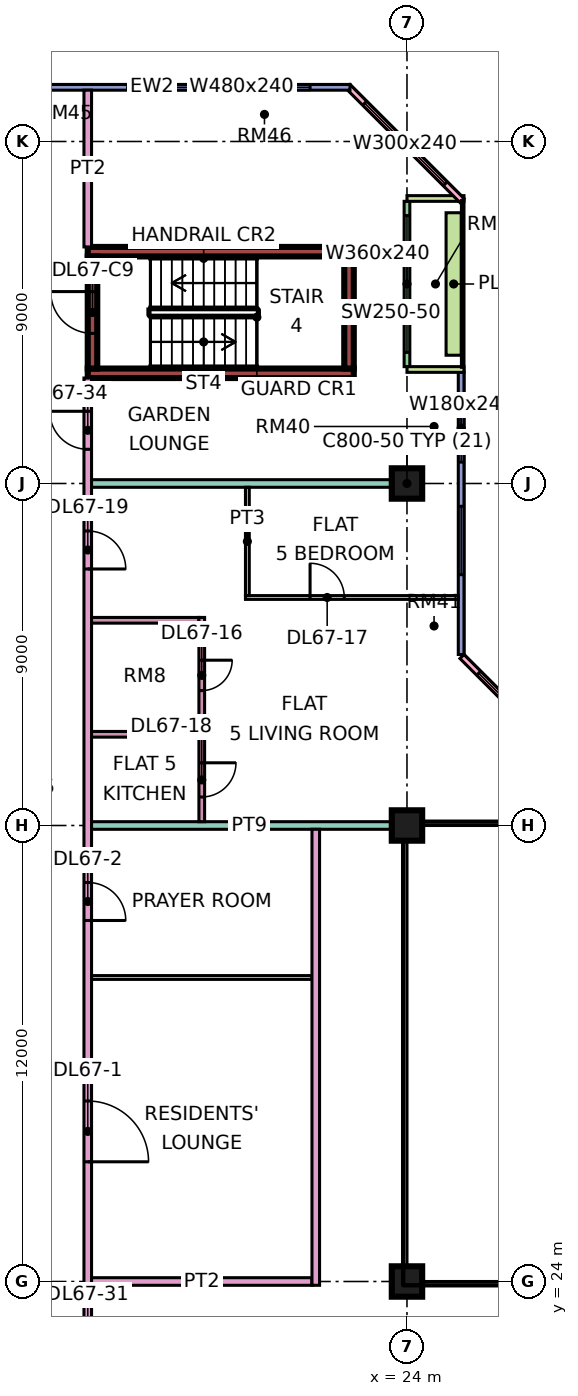
"""IFC4 building model, lengths in metres.
Left out: names, types, materials, properties, quantities, classifications, styles, units other than length and angle.
Written with IfcOpenShell. Run it as: python <this file> out.ifc"""

import sys

from ifc_helpers import new_model, si_unit, direction, frame, frame_2d, origin, origin_2d, place, context, subcontext, project, spatial, rectangle, extrude, element, fill, save


model = new_model("IFC4")
c1 = context("Model", 3, precision=1e-05, world=origin(), true_north=direction((0.0, 1.0)))
c2 = subcontext(c1, "Body", "Model", "MODEL_VIEW")
j1 = project(units=[si_unit("LENGTHUNIT", "METRE"), si_unit("PLANEANGLEUNIT", "RADIAN")], contexts=[c1])
p1 = place(None, origin())
s1 = spatial("IfcSite", under=j1, at=p1, CompositionType="ELEMENT")
p2 = place(p1, origin())
s2 = spatial("IfcBuilding", under=s1, at=p2, CompositionType="ELEMENT")
p3 = place(p2, frame((0.0, 0.0, 288.4)))
s3 = spatial("IfcBuildingStorey", under=s2, at=p3, CompositionType="ELEMENT", Elevation=288.4)
for number, where, z_axis, x_axis in (
    (1, (24.0, 24.0, 0.0), (0.0, 0.0, 1.0), (1.0, 0.0, 0.0)),
    (2, (24.0, 36.0, 0.0), (0.0, 0.0, 1.0), (1.0, 0.0, 0.0)),
    (3, (24.0, 45.0, 0.0), (0.0, 0.0, 1.0), (1.0, 0.0, 0.0)),
):
    element("IfcColumn", number, at=place(p3, frame(where, z_axis=z_axis, x_axis=x_axis)), inside=s3, PredefinedType="COLUMN", context=c2, shape_type="SweptSolid", body=[
        extrude(rectangle(XDim=0.8, YDim=0.8, at=origin_2d()), origin(), (0.0, 0.0, 1.0), 3.75),
    ])
for number, where, z_axis, x_axis in (
    (4, (15.6, 47.9, 0.0), (0.0, 0.0, 1.0), (1.0, 0.0, 0.0)),
    (5, (15.6, 51.1, 0.0), (0.0, 0.0, 1.0), (1.0, 0.0, 0.0)),
):
    element("IfcWall", number, at=place(p3, frame(where, z_axis=z_axis, x_axis=x_axis)), inside=s3, PredefinedType="SHEAR", context=c2, shape_type="SweptSolid", body=[
        extrude(rectangle(XDim=7.0, YDim=0.25, at=frame_2d((3.5, 0.0))), origin(), (0.0, 0.0, 1.0), 3.75),
    ])
p4 = place(p3, frame((15.725, 48.025, 0.0), z_axis=(0.0, 0.0, 1.0), x_axis=(0.0, 1.0, 0.0)))
e6 = element("IfcWall", 6, at=p4, inside=s3, PredefinedType="SHEAR", context=c2, shape_type="SweptSolid", body=[
    extrude(rectangle(XDim=2.95, YDim=0.25, at=frame_2d((1.475, 0.0))), origin(), (0.0, 0.0, 1.0), 3.75),
])
p5 = place(p4, frame((0.925, 0.0, 0.0)))
e7 = element("IfcOpeningElement", 7, at=p5, cuts=e6, PredefinedType="OPENING", context=c2, shape_type="SweptSolid", body=[
    extrude(rectangle(XDim=1.1, YDim=2.2, at=frame_2d((0.55, 1.1))), frame((0.0, 0.135, 0.0), z_axis=(0.0, -1.0, 0.0), x_axis=(1.0, 0.0, 0.0)), (0.0, 0.0, 1.0), 0.27),
])
p6 = place(p3, frame((22.475, 48.025, 0.0), z_axis=(0.0, 0.0, 1.0), x_axis=(0.0, 1.0, 0.0)))
e8 = element("IfcWall", 8, at=p6, inside=s3, PredefinedType="SHEAR", context=c2, shape_type="SweptSolid", body=[
    extrude(rectangle(XDim=2.95, YDim=0.25, at=frame_2d((1.475, 0.0))), origin(), (0.0, 0.0, 1.0), 3.75),
])
p7 = place(p3, frame((28.447, 37.447, 0.0), z_axis=(0.0, 0.0, 1.0), x_axis=(-0.707106781187, 0.707106781187, 0.0)))
e9 = element("IfcWall", 9, at=p7, inside=s3, PredefinedType="SOLIDWALL", context=c2, shape_type="SweptSolid", body=[
    extrude(rectangle(XDim=4.243, YDim=0.15, at=frame_2d((2.121, 0.0))), origin(), (0.0, 0.0, 1.0), 3.35),
])
p8 = place(p7, frame((0.621, 0.0, 0.45)))
e10 = element("IfcOpeningElement", 10, at=p8, cuts=e9, PredefinedType="OPENING", context=c2, shape_type="SweptSolid", body=[
    extrude(rectangle(XDim=3.0, YDim=2.4, at=frame_2d((1.5, 1.2))), frame((0.0, 0.085, 0.0), z_axis=(0.0, -1.0, 0.0), x_axis=(1.0, 0.0, 0.0)), (0.0, 0.0, 1.0), 0.17),
])
p9 = place(p3, frame((25.425, 40.5, 0.0), z_axis=(0.0, 0.0, 1.0), x_axis=(0.0, 1.0, 0.0)))
e11 = element("IfcWall", 11, at=p9, inside=s3, PredefinedType="SOLIDWALL", context=c2, shape_type="SweptSolid", body=[
    extrude(rectangle(XDim=7.425, YDim=0.15, at=frame_2d((3.712, 0.0))), origin(), (0.0, 0.0, 1.0), 3.35),
])
p10 = place(p9, frame((2.1, 0.0, 0.45)))
e12 = element("IfcOpeningElement", 12, at=p10, cuts=e11, PredefinedType="OPENING", context=c2, shape_type="SweptSolid", body=[
    extrude(rectangle(XDim=1.8, YDim=2.4, at=frame_2d((0.9, 1.2))), frame((0.0, 0.085, 0.0), z_axis=(0.0, -1.0, 0.0), x_axis=(1.0, 0.0, 0.0)), (0.0, 0.0, 1.0), 0.17),
])
p11 = place(p9, frame((5.062, 0.0, 0.45)))
e13 = element("IfcOpeningElement", 13, at=p11, cuts=e11, PredefinedType="OPENING", context=c2, shape_type="SweptSolid", body=[
    extrude(rectangle(XDim=1.8, YDim=2.4, at=frame_2d((0.9, 1.2))), frame((0.0, 0.085, 0.0), z_axis=(0.0, -1.0, 0.0), x_axis=(1.0, 0.0, 0.0)), (0.0, 0.0, 1.0), 0.17),
])
p12 = place(p3, frame((24.0, 48.075, 0.0), z_axis=(0.0, 0.0, 1.0), x_axis=(0.0, 1.0, 0.0)))
e14 = element("IfcWall", 14, at=p12, inside=s3, PredefinedType="SOLIDWALL", context=c2, shape_type="SweptSolid", body=[
    extrude(rectangle(XDim=4.35, YDim=0.15, at=frame_2d((2.175, 0.0))), origin(), (0.0, 0.0, 1.0), 3.35),
])
p13 = place(p12, frame((0.375, 0.0, 0.45)))
e15 = element("IfcOpeningElement", 15, at=p13, cuts=e14, PredefinedType="OPENING", context=c2, shape_type="SweptSolid", body=[
    extrude(rectangle(XDim=3.6, YDim=2.4, at=frame_2d((1.8, 1.2))), frame((0.0, 0.085, 0.0), z_axis=(0.0, -1.0, 0.0), x_axis=(1.0, 0.0, 0.0)), (0.0, 0.0, 1.0), 0.17),
])
for number, where, z_axis, x_axis in (
    (16, (25.5, 48.0, 0.0), (0.0, 0.0, 1.0), (-1.0, 0.0, 0.0)),
    (17, (25.5, 52.5, 0.0), (0.0, 0.0, 1.0), (-1.0, 0.0, 0.0)),
):
    element("IfcWall", number, at=place(p3, frame(where, z_axis=z_axis, x_axis=x_axis)), inside=s3, PredefinedType="SOLIDWALL", context=c2, shape_type="SweptSolid", body=[
        extrude(rectangle(XDim=1.5, YDim=0.15, at=frame_2d((0.75, 0.0))), origin(), (0.0, 0.0, 1.0), 3.35),
    ])
p14 = place(p3, frame((25.447, 52.447, 0.0), z_axis=(0.0, 0.0, 1.0), x_axis=(-0.707106781187, 0.707106781187, 0.0)))
e18 = element("IfcWall", 18, at=p14, inside=s3, PredefinedType="SOLIDWALL", context=c2, shape_type="SweptSolid", body=[
    extrude(rectangle(XDim=4.243, YDim=0.15, at=frame_2d((2.121, 0.0))), origin(), (0.0, 0.0, 1.0), 3.35),
])
p15 = place(p14, frame((0.621, 0.0, 0.45)))
e19 = element("IfcOpeningElement", 19, at=p15, cuts=e18, PredefinedType="OPENING", context=c2, shape_type="SweptSolid", body=[
    extrude(rectangle(XDim=3.0, YDim=2.4, at=frame_2d((1.5, 1.2))), frame((0.0, 0.085, 0.0), z_axis=(0.0, -1.0, 0.0), x_axis=(1.0, 0.0, 0.0)), (0.0, 0.0, 1.0), 0.17),
])
p16 = place(p3, frame((22.5, 55.425, 0.0), z_axis=(0.0, 0.0, 1.0), x_axis=(-1.0, 0.0, 0.0)))
e20 = element("IfcWall", 20, at=p16, inside=s3, PredefinedType="SOLIDWALL", context=c2, shape_type="SweptSolid", body=[
    extrude(rectangle(XDim=10.425, YDim=0.15, at=frame_2d((5.212, 0.0))), origin(), (0.0, 0.0, 1.0), 3.35),
])
p17 = place(p16, frame((1.05, 0.0, 0.45)))
e21 = element("IfcOpeningElement", 21, at=p17, cuts=e20, PredefinedType="OPENING", context=c2, shape_type="SweptSolid", body=[
    extrude(rectangle(XDim=4.8, YDim=2.4, at=frame_2d((2.4, 1.2))), frame((0.0, 0.085, 0.0), z_axis=(0.0, -1.0, 0.0), x_axis=(1.0, 0.0, 0.0)), (0.0, 0.0, 1.0), 0.17),
])
p18 = place(p3, frame((25.229, 48.375, 0.0), z_axis=(0.0, 0.0, 1.0), x_axis=(0.0, 1.0, 0.0)))
e22 = element("IfcWall", 22, at=p18, inside=s3, PredefinedType="SOLIDWALL", context=c2, shape_type="SweptSolid", body=[
    extrude(rectangle(XDim=3.75, YDim=0.4, at=frame_2d((1.875, 0.0))), origin(), (0.0, 0.0, 1.0), 0.7),
])
p19 = place(p3, frame((15.6, 20.0, 0.0), z_axis=(0.0, 0.0, 1.0), x_axis=(0.0, 1.0, 0.0)))
e23 = element("IfcWall", 23, at=p19, inside=s3, PredefinedType="PARTITIONING", context=c2, shape_type="SweptSolid", body=[
    extrude(rectangle(XDim=27.775, YDim=0.2, at=frame_2d((13.887, 0.0))), origin(), (0.0, 0.0, 1.0), 3.35),
])
p20 = place(p19, frame((7.15, 0.0, 0.0)))
e24 = element("IfcOpeningElement", 24, at=p20, cuts=e23, PredefinedType="OPENING", context=c2, shape_type="SweptSolid", body=[
    extrude(rectangle(XDim=1.6, YDim=2.1, at=frame_2d((0.8, 1.05))), frame((0.0, 0.11, 0.0), z_axis=(0.0, -1.0, 0.0), x_axis=(1.0, 0.0, 0.0)), (0.0, 0.0, 1.0), 0.22),
])
p21 = place(p19, frame((13.5, 0.0, 0.0)))
e25 = element("IfcOpeningElement", 25, at=p21, cuts=e23, PredefinedType="OPENING", context=c2, shape_type="SweptSolid", body=[
    extrude(rectangle(XDim=1.0, YDim=2.1, at=frame_2d((0.5, 1.05))), frame((0.0, 0.11, 0.0), z_axis=(0.0, -1.0, 0.0), x_axis=(1.0, 0.0, 0.0)), (0.0, 0.0, 1.0), 0.22),
])
p22 = place(p19, frame((22.75, 0.0, 0.0)))
e26 = element("IfcOpeningElement", 26, at=p22, cuts=e23, PredefinedType="OPENING", context=c2, shape_type="SweptSolid", body=[
    extrude(rectangle(XDim=1.0, YDim=2.1, at=frame_2d((0.5, 1.05))), frame((0.0, 0.11, 0.0), z_axis=(0.0, -1.0, 0.0), x_axis=(1.0, 0.0, 0.0)), (0.0, 0.0, 1.0), 0.22),
])
p23 = place(p19, frame((1.15, 0.0, 0.0)))
e27 = element("IfcOpeningElement", 27, at=p23, cuts=e23, PredefinedType="OPENING", context=c2, shape_type="SweptSolid", body=[
    extrude(rectangle(XDim=1.8, YDim=2.1, at=frame_2d((0.9, 1.05))), frame((0.0, 0.11, 0.0), z_axis=(0.0, -1.0, 0.0), x_axis=(1.0, 0.0, 0.0)), (0.0, 0.0, 1.0), 0.22),
])
p24 = place(p19, frame((25.9, 0.0, 0.0)))
e28 = element("IfcOpeningElement", 28, at=p24, cuts=e23, PredefinedType="OPENING", context=c2, shape_type="SweptSolid", body=[
    extrude(rectangle(XDim=1.0, YDim=2.1, at=frame_2d((0.5, 1.05))), frame((0.0, 0.11, 0.0), z_axis=(0.0, -1.0, 0.0), x_axis=(1.0, 0.0, 0.0)), (0.0, 0.0, 1.0), 0.22),
])
p25 = place(p3, frame((15.6, 51.225, 0.0), z_axis=(0.0, 0.0, 1.0), x_axis=(0.0, 1.0, 0.0)))
e29 = element("IfcWall", 29, at=p25, inside=s3, PredefinedType="PARTITIONING", context=c2, shape_type="SweptSolid", body=[
    extrude(rectangle(XDim=4.125, YDim=0.2, at=frame_2d((2.062, 0.0))), origin(), (0.0, 0.0, 1.0), 3.35),
])
p26 = place(p3, frame((15.7, 24.0, 0.0), z_axis=(0.0, 0.0, 1.0), x_axis=(1.0, 0.0, 0.0)))
e30 = element("IfcWall", 30, at=p26, inside=s3, PredefinedType="PARTITIONING", context=c2, shape_type="SweptSolid", body=[
    extrude(rectangle(XDim=5.8, YDim=0.2, at=frame_2d((2.9, 0.0))), origin(), (0.0, 0.0, 1.0), 3.35),
])
p27 = place(p3, frame((15.7, 32.0, 0.0), z_axis=(0.0, 0.0, 1.0), x_axis=(1.0, 0.0, 0.0)))
e31 = element("IfcWall", 31, at=p27, inside=s3, PredefinedType="PARTITIONING", context=c2, shape_type="SweptSolid", body=[
    extrude(rectangle(XDim=5.8, YDim=0.1, at=frame_2d((2.9, 0.0))), origin(), (0.0, 0.0, 1.0), 3.35),
])
p28 = place(p3, frame((15.7, 36.0, 0.0), z_axis=(0.0, 0.0, 1.0), x_axis=(1.0, 0.0, 0.0)))
e32 = element("IfcWall", 32, at=p28, inside=s3, PredefinedType="PARTITIONING", context=c2, shape_type="SweptSolid", body=[
    extrude(rectangle(XDim=8.3, YDim=0.2, at=frame_2d((4.15, 0.0))), origin(), (0.0, 0.0, 1.0), 3.35),
])
for number, where, z_axis, x_axis in (
    (33, (15.7, 38.4, 0.0), (0.0, 0.0, 1.0), (1.0, 0.0, 0.0)),
    (34, (15.7, 41.4, 0.0), (0.0, 0.0, 1.0), (1.0, 0.0, 0.0)),
):
    element("IfcWall", number, at=place(p3, frame(where, z_axis=z_axis, x_axis=x_axis)), inside=s3, PredefinedType="PARTITIONING", context=c2, shape_type="SweptSolid", body=[
        extrude(rectangle(XDim=2.825, YDim=0.15, at=frame_2d((1.413, 0.0))), origin(), (0.0, 0.0, 1.0), 3.35),
    ])
p29 = place(p3, frame((15.7, 45.0, 0.0), z_axis=(0.0, 0.0, 1.0), x_axis=(1.0, 0.0, 0.0)))
e35 = element("IfcWall", 35, at=p29, inside=s3, PredefinedType="PARTITIONING", context=c2, shape_type="SweptSolid", body=[
    extrude(rectangle(XDim=8.3, YDim=0.2, at=frame_2d((4.15, 0.0))), origin(), (0.0, 0.0, 1.0), 3.35),
])
p30 = place(p3, frame((18.6, 36.1, 0.0), z_axis=(0.0, 0.0, 1.0), x_axis=(0.0, 1.0, 0.0)))
e36 = element("IfcWall", 36, at=p30, inside=s3, PredefinedType="PARTITIONING", context=c2, shape_type="SweptSolid", body=[
    extrude(rectangle(XDim=5.375, YDim=0.15, at=frame_2d((2.688, 0.0))), origin(), (0.0, 0.0, 1.0), 3.35),
])
p31 = place(p30, frame((3.45, 0.0, 0.0)))
e37 = element("IfcOpeningElement", 37, at=p31, cuts=e36, PredefinedType="OPENING", context=c2, shape_type="SweptSolid", body=[
    extrude(rectangle(XDim=0.8, YDim=2.1, at=frame_2d((0.4, 1.05))), frame((0.0, 0.085, 0.0), z_axis=(0.0, -1.0, 0.0), x_axis=(1.0, 0.0, 0.0)), (0.0, 0.0, 1.0), 0.17),
])
p32 = place(p30, frame((0.65, 0.0, 0.0)))
e38 = element("IfcOpeningElement", 38, at=p32, cuts=e36, PredefinedType="OPENING", context=c2, shape_type="SweptSolid", body=[
    extrude(rectangle(XDim=0.9, YDim=2.1, at=frame_2d((0.45, 1.05))), frame((0.0, 0.085, 0.0), z_axis=(0.0, -1.0, 0.0), x_axis=(1.0, 0.0, 0.0)), (0.0, 0.0, 1.0), 0.17),
])
p33 = place(p3, frame((19.75, 42.0, 0.0), z_axis=(0.0, 0.0, 1.0), x_axis=(1.0, 0.0, 0.0)))
e39 = element("IfcWall", 39, at=p33, inside=s3, PredefinedType="PARTITIONING", context=c2, shape_type="SweptSolid", body=[
    extrude(rectangle(XDim=5.6, YDim=0.1, at=frame_2d((2.8, 0.0))), origin(), (0.0, 0.0, 1.0), 3.35),
])
p34 = place(p33, frame((1.7, 0.0, 0.0)))
e40 = element("IfcOpeningElement", 40, at=p34, cuts=e39, PredefinedType="OPENING", context=c2, shape_type="SweptSolid", body=[
    extrude(rectangle(XDim=0.9, YDim=2.1, at=frame_2d((0.45, 1.05))), frame((0.0, 0.06, 0.0), z_axis=(0.0, -1.0, 0.0), x_axis=(1.0, 0.0, 0.0)), (0.0, 0.0, 1.0), 0.12),
])
p35 = place(p3, frame((19.8, 42.05, 0.0), z_axis=(0.0, 0.0, 1.0), x_axis=(0.0, 1.0, 0.0)))
e41 = element("IfcWall", 41, at=p35, inside=s3, PredefinedType="PARTITIONING", context=c2, shape_type="SweptSolid", body=[
    extrude(rectangle(XDim=2.85, YDim=0.1, at=frame_2d((1.425, 0.0))), origin(), (0.0, 0.0, 1.0), 3.35),
])
p36 = place(p3, frame((21.6, 23.9, 0.0), z_axis=(0.0, 0.0, 1.0), x_axis=(0.0, 1.0, 0.0)))
e42 = element("IfcWall", 42, at=p36, inside=s3, PredefinedType="PARTITIONING", context=c2, shape_type="SweptSolid", body=[
    extrude(rectangle(XDim=12.0, YDim=0.2, at=frame_2d((6.0, 0.0))), origin(), (0.0, 0.0, 1.0), 3.35),
])
p37 = place(p8, origin())
e43 = element("IfcWindow", 43, at=p37, inside=s3, PartitioningType="SINGLE_PANEL", PredefinedType="WINDOW", context=c2, shape_type="SweptSolid", body=[
    extrude(rectangle(XDim=3.0, YDim=2.4, at=frame_2d((1.5, 1.2))), frame((0.0, 0.03, 0.0), z_axis=(0.0, -1.0, 0.0), x_axis=(1.0, 0.0, 0.0)), (0.0, 0.0, 1.0), 0.06),
])
fill(e10, e43)
p38 = place(p10, origin())
e44 = element("IfcWindow", 44, at=p38, inside=s3, PartitioningType="SINGLE_PANEL", PredefinedType="WINDOW", context=c2, shape_type="SweptSolid", body=[
    extrude(rectangle(XDim=1.8, YDim=2.4, at=frame_2d((0.9, 1.2))), frame((0.0, 0.03, 0.0), z_axis=(0.0, -1.0, 0.0), x_axis=(1.0, 0.0, 0.0)), (0.0, 0.0, 1.0), 0.06),
])
fill(e12, e44)
p39 = place(p11, origin())
e45 = element("IfcWindow", 45, at=p39, inside=s3, PartitioningType="SINGLE_PANEL", PredefinedType="WINDOW", context=c2, shape_type="SweptSolid", body=[
    extrude(rectangle(XDim=1.8, YDim=2.4, at=frame_2d((0.9, 1.2))), frame((0.0, 0.03, 0.0), z_axis=(0.0, -1.0, 0.0), x_axis=(1.0, 0.0, 0.0)), (0.0, 0.0, 1.0), 0.06),
])
fill(e13, e45)
p40 = place(p13, origin())
e46 = element("IfcWindow", 46, at=p40, inside=s3, PartitioningType="SINGLE_PANEL", PredefinedType="WINDOW", context=c2, shape_type="SweptSolid", body=[
    extrude(rectangle(XDim=3.6, YDim=2.4, at=frame_2d((1.8, 1.2))), frame((0.0, 0.03, 0.0), z_axis=(0.0, -1.0, 0.0), x_axis=(1.0, 0.0, 0.0)), (0.0, 0.0, 1.0), 0.06),
])
fill(e15, e46)
p41 = place(p15, origin())
e47 = element("IfcWindow", 47, at=p41, inside=s3, PartitioningType="SINGLE_PANEL", PredefinedType="WINDOW", context=c2, shape_type="SweptSolid", body=[
    extrude(rectangle(XDim=3.0, YDim=2.4, at=frame_2d((1.5, 1.2))), frame((0.0, 0.03, 0.0), z_axis=(0.0, -1.0, 0.0), x_axis=(1.0, 0.0, 0.0)), (0.0, 0.0, 1.0), 0.06),
])
fill(e19, e47)
p42 = place(p17, origin())
e48 = element("IfcWindow", 48, at=p42, inside=s3, PartitioningType="SINGLE_PANEL", PredefinedType="WINDOW", context=c2, shape_type="SweptSolid", body=[
    extrude(rectangle(XDim=4.8, YDim=2.4, at=frame_2d((2.4, 1.2))), frame((0.0, 0.03, 0.0), z_axis=(0.0, -1.0, 0.0), x_axis=(1.0, 0.0, 0.0)), (0.0, 0.0, 1.0), 0.06),
])
fill(e21, e48)
p43 = place(p5, frame((1.1, 0.0, 0.0), z_axis=(0.0, 0.0, 1.0), x_axis=(-1.0, 0.0, 0.0)))
e49 = element("IfcDoor", 49, at=p43, inside=s3, OperationType="SINGLE_SWING_RIGHT", PredefinedType="DOOR", context=c2, shape_type="SweptSolid", body=[
    extrude(rectangle(XDim=1.1, YDim=2.2, at=frame_2d((0.55, 1.1))), frame((0.0, 0.025, 0.0), z_axis=(0.0, -1.0, 0.0), x_axis=(1.0, 0.0, 0.0)), (0.0, 0.0, 1.0), 0.05),
])
fill(e7, e49)
p44 = place(p20, frame((1.6, 0.0, 0.0), z_axis=(0.0, 0.0, 1.0), x_axis=(-1.0, 0.0, 0.0)))
e50 = element("IfcDoor", 50, at=p44, inside=s3, OperationType="DOUBLE_DOOR_SINGLE_SWING", PredefinedType="DOOR", context=c2, shape_type="SweptSolid", body=[
    extrude(rectangle(XDim=1.6, YDim=2.1, at=frame_2d((0.8, 1.05))), frame((0.0, 0.025, 0.0), z_axis=(0.0, -1.0, 0.0), x_axis=(1.0, 0.0, 0.0)), (0.0, 0.0, 1.0), 0.05),
])
fill(e24, e50)
p45 = place(p21, frame((1.0, 0.0, 0.0), z_axis=(0.0, 0.0, 1.0), x_axis=(-1.0, 0.0, 0.0)))
e51 = element("IfcDoor", 51, at=p45, inside=s3, OperationType="SINGLE_SWING_LEFT", PredefinedType="DOOR", context=c2, shape_type="SweptSolid", body=[
    extrude(rectangle(XDim=1.0, YDim=2.1, at=frame_2d((0.5, 1.05))), frame((0.0, 0.025, 0.0), z_axis=(0.0, -1.0, 0.0), x_axis=(1.0, 0.0, 0.0)), (0.0, 0.0, 1.0), 0.05),
])
fill(e25, e51)
p46 = place(p31, origin())
e52 = element("IfcDoor", 52, at=p46, inside=s3, OperationType="SINGLE_SWING_RIGHT", PredefinedType="DOOR", context=c2, shape_type="SweptSolid", body=[
    extrude(rectangle(XDim=0.8, YDim=2.1, at=frame_2d((0.4, 1.05))), frame((0.0, 0.025, 0.0), z_axis=(0.0, -1.0, 0.0), x_axis=(1.0, 0.0, 0.0)), (0.0, 0.0, 1.0), 0.05),
])
fill(e37, e52)
p47 = place(p34, origin())
e53 = element("IfcDoor", 53, at=p47, inside=s3, OperationType="SINGLE_SWING_LEFT", PredefinedType="DOOR", context=c2, shape_type="SweptSolid", body=[
    extrude(rectangle(XDim=0.9, YDim=2.1, at=frame_2d((0.45, 1.05))), frame((0.0, 0.025, 0.0), z_axis=(0.0, -1.0, 0.0), x_axis=(1.0, 0.0, 0.0)), (0.0, 0.0, 1.0), 0.05),
])
fill(e40, e53)
p48 = place(p32, origin())
e54 = element("IfcDoor", 54, at=p48, inside=s3, OperationType="SINGLE_SWING_RIGHT", PredefinedType="DOOR", context=c2, shape_type="SweptSolid", body=[
    extrude(rectangle(XDim=0.9, YDim=2.1, at=frame_2d((0.45, 1.05))), frame((0.0, 0.025, 0.0), z_axis=(0.0, -1.0, 0.0), x_axis=(1.0, 0.0, 0.0)), (0.0, 0.0, 1.0), 0.05),
])
fill(e38, e54)
p49 = place(p22, frame((1.0, 0.0, 0.0), z_axis=(0.0, 0.0, 1.0), x_axis=(-1.0, 0.0, 0.0)))
e55 = element("IfcDoor", 55, at=p49, inside=s3, OperationType="SINGLE_SWING_LEFT", PredefinedType="DOOR", context=c2, shape_type="SweptSolid", body=[
    extrude(rectangle(XDim=1.0, YDim=2.1, at=frame_2d((0.5, 1.05))), frame((0.0, 0.025, 0.0), z_axis=(0.0, -1.0, 0.0), x_axis=(1.0, 0.0, 0.0)), (0.0, 0.0, 1.0), 0.05),
])
fill(e26, e55)
p50 = place(p24, frame((1.0, 0.0, 0.0), z_axis=(0.0, 0.0, 1.0), x_axis=(-1.0, 0.0, 0.0)))
e56 = element("IfcDoor", 56, at=p50, inside=s3, OperationType="SINGLE_SWING_RIGHT", PredefinedType="DOOR", context=c2, shape_type="SweptSolid", body=[
    extrude(rectangle(XDim=1.0, YDim=2.1, at=frame_2d((0.5, 1.05))), frame((0.0, 0.025, 0.0), z_axis=(0.0, -1.0, 0.0), x_axis=(1.0, 0.0, 0.0)), (0.0, 0.0, 1.0), 0.05),
])
fill(e28, e56)
save(model, sys.argv[1])
